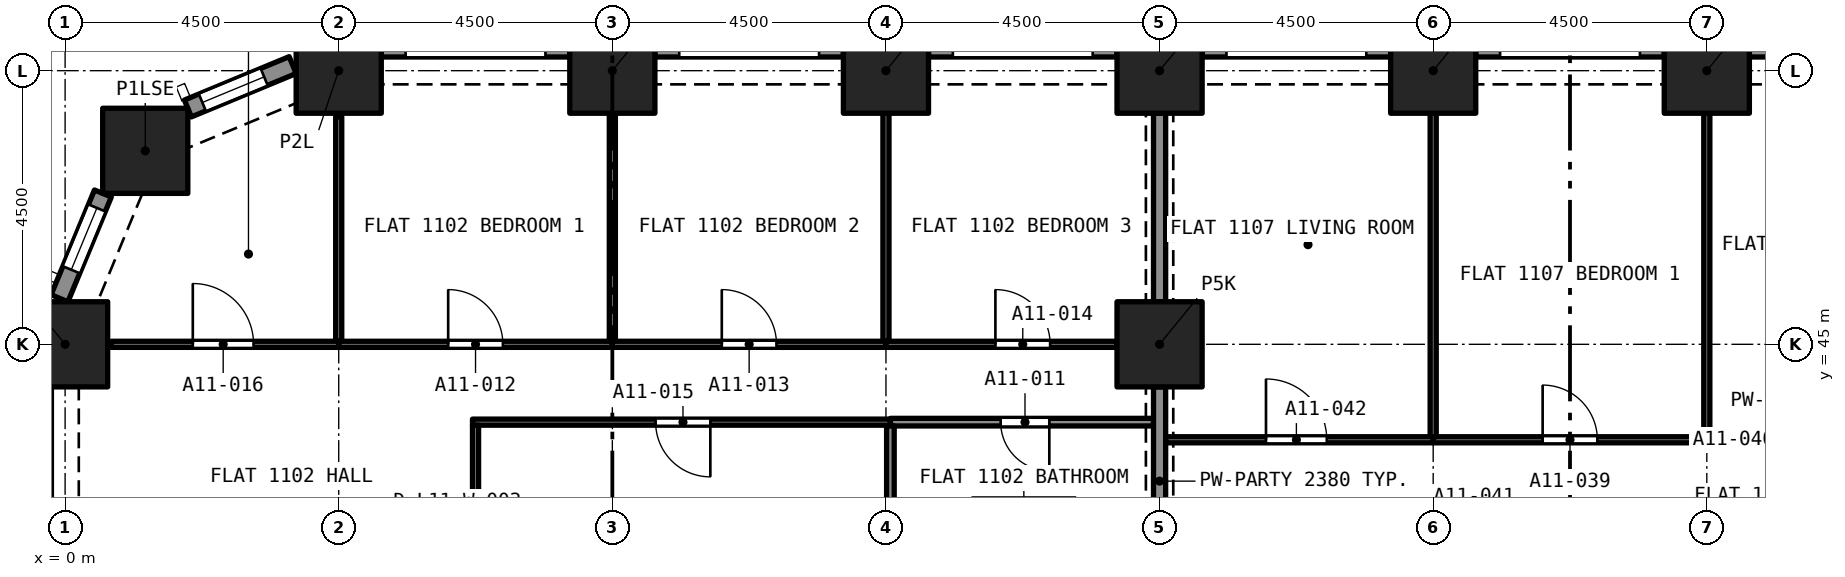
"""IFC4 building model, lengths in metres.
Left out: names, types, materials, properties, quantities, classifications, styles, units other than length and angle.
Written with IfcOpenShell. Run it as: python <this file> out.ifc"""

import sys

from ifc_helpers import new_model, si_unit, direction, frame, frame_2d, origin, origin_2d, place, context, subcontext, project, spatial, rectangle, extrude, element, fill, save


model = new_model("IFC4")
c1 = context("Model", 3, precision=1e-05, world=origin(), true_north=direction((0.0, 1.0)))
c2 = subcontext(c1, "Body", "Model", "MODEL_VIEW")
j1 = project(units=[si_unit("LENGTHUNIT", "METRE"), si_unit("PLANEANGLEUNIT", "RADIAN")], contexts=[c1])
p1 = place(None, origin())
s1 = spatial("IfcSite", under=j1, at=p1, CompositionType="ELEMENT")
p2 = place(p1, origin())
s2 = spatial("IfcBuilding", under=s1, at=p2, CompositionType="ELEMENT")
p3 = place(p2, frame((0.0, 0.0, 46.4)))
s3 = spatial("IfcBuildingStorey", under=s2, at=p3, CompositionType="ELEMENT", Elevation=46.4)
for number, where, z_axis, x_axis in (
    (1, (0.0, 45.0, 0.0), (0.0, 0.0, 1.0), (1.0, 0.0, 0.0)),
    (2, (18.0, 45.0, 0.0), (0.0, 0.0, 1.0), (1.0, 0.0, 0.0)),
    (3, (1.318, 48.182, 0.0), (0.0, 0.0, 1.0), (1.0, 0.0, 0.0)),
    (4, (4.5, 49.5, 0.0), (0.0, 0.0, 1.0), (1.0, 0.0, 0.0)),
    (5, (9.0, 49.5, 0.0), (0.0, 0.0, 1.0), (1.0, 0.0, 0.0)),
    (6, (13.5, 49.5, 0.0), (0.0, 0.0, 1.0), (1.0, 0.0, 0.0)),
    (7, (18.0, 49.5, 0.0), (0.0, 0.0, 1.0), (1.0, 0.0, 0.0)),
    (8, (22.5, 49.5, 0.0), (0.0, 0.0, 1.0), (1.0, 0.0, 0.0)),
    (9, (27.0, 49.5, 0.0), (0.0, 0.0, 1.0), (1.0, 0.0, 0.0)),
):
    element("IfcColumn", number, at=place(p3, frame(where, z_axis=z_axis, x_axis=x_axis)), inside=s3, PredefinedType="COLUMN", context=c2, shape_type="SweptSolid", body=[
        extrude(rectangle(XDim=1.4, YDim=1.4, at=origin_2d()), origin(), (0.0, 0.0, 1.0), 3.2),
    ])
p4 = place(p3, frame((27.7, 49.875, 0.0), z_axis=(0.0, 0.0, 1.0), x_axis=(1.0, 0.0, 0.0)))
e10 = element("IfcWall", 10, at=p4, inside=s3, PredefinedType="SOLIDWALL", context=c2, shape_type="SweptSolid", body=[
    extrude(rectangle(XDim=3.1, YDim=0.3, at=frame_2d((1.55, 0.0))), origin(), (0.0, 0.0, 1.0), 3.2),
])
p5 = place(p4, frame((0.4, 0.0, 0.45)))
e11 = element("IfcOpeningElement", 11, at=p5, cuts=e10, PredefinedType="OPENING", context=c2, shape_type="SweptSolid", body=[
    extrude(rectangle(XDim=2.3, YDim=1.95, at=frame_2d((1.15, 0.975))), frame((0.0, 0.16, 0.0), z_axis=(0.0, -1.0, 0.0), x_axis=(1.0, 0.0, 0.0)), (0.0, 0.0, 1.0), 0.32),
])
p6 = place(p3, frame((23.2, 49.875, 0.0), z_axis=(0.0, 0.0, 1.0), x_axis=(1.0, 0.0, 0.0)))
e12 = element("IfcWall", 12, at=p6, inside=s3, PredefinedType="SOLIDWALL", context=c2, shape_type="SweptSolid", body=[
    extrude(rectangle(XDim=3.1, YDim=0.3, at=frame_2d((1.55, 0.0))), origin(), (0.0, 0.0, 1.0), 3.2),
])
p7 = place(p6, frame((0.4, 0.0, 0.45)))
e13 = element("IfcOpeningElement", 13, at=p7, cuts=e12, PredefinedType="OPENING", context=c2, shape_type="SweptSolid", body=[
    extrude(rectangle(XDim=2.3, YDim=1.95, at=frame_2d((1.15, 0.975))), frame((0.0, 0.16, 0.0), z_axis=(0.0, -1.0, 0.0), x_axis=(1.0, 0.0, 0.0)), (0.0, 0.0, 1.0), 0.32),
])
p8 = place(p3, frame((18.7, 49.875, 0.0), z_axis=(0.0, 0.0, 1.0), x_axis=(1.0, 0.0, 0.0)))
e14 = element("IfcWall", 14, at=p8, inside=s3, PredefinedType="SOLIDWALL", context=c2, shape_type="SweptSolid", body=[
    extrude(rectangle(XDim=3.1, YDim=0.3, at=frame_2d((1.55, 0.0))), origin(), (0.0, 0.0, 1.0), 3.2),
])
p9 = place(p8, frame((0.4, 0.0, 0.45)))
e15 = element("IfcOpeningElement", 15, at=p9, cuts=e14, PredefinedType="OPENING", context=c2, shape_type="SweptSolid", body=[
    extrude(rectangle(XDim=2.3, YDim=1.95, at=frame_2d((1.15, 0.975))), frame((0.0, 0.16, 0.0), z_axis=(0.0, -1.0, 0.0), x_axis=(1.0, 0.0, 0.0)), (0.0, 0.0, 1.0), 0.32),
])
p10 = place(p3, frame((14.2, 49.875, 0.0), z_axis=(0.0, 0.0, 1.0), x_axis=(1.0, 0.0, 0.0)))
e16 = element("IfcWall", 16, at=p10, inside=s3, PredefinedType="SOLIDWALL", context=c2, shape_type="SweptSolid", body=[
    extrude(rectangle(XDim=3.1, YDim=0.3, at=frame_2d((1.55, 0.0))), origin(), (0.0, 0.0, 1.0), 3.2),
])
p11 = place(p10, frame((0.4, 0.0, 0.45)))
e17 = element("IfcOpeningElement", 17, at=p11, cuts=e16, PredefinedType="OPENING", context=c2, shape_type="SweptSolid", body=[
    extrude(rectangle(XDim=2.3, YDim=1.95, at=frame_2d((1.15, 0.975))), frame((0.0, 0.16, 0.0), z_axis=(0.0, -1.0, 0.0), x_axis=(1.0, 0.0, 0.0)), (0.0, 0.0, 1.0), 0.32),
])
p12 = place(p3, frame((9.7, 49.875, 0.0), z_axis=(0.0, 0.0, 1.0), x_axis=(1.0, 0.0, 0.0)))
e18 = element("IfcWall", 18, at=p12, inside=s3, PredefinedType="SOLIDWALL", context=c2, shape_type="SweptSolid", body=[
    extrude(rectangle(XDim=3.1, YDim=0.3, at=frame_2d((1.55, 0.0))), origin(), (0.0, 0.0, 1.0), 3.2),
])
p13 = place(p12, frame((0.4, 0.0, 0.45)))
e19 = element("IfcOpeningElement", 19, at=p13, cuts=e18, PredefinedType="OPENING", context=c2, shape_type="SweptSolid", body=[
    extrude(rectangle(XDim=2.3, YDim=1.95, at=frame_2d((1.15, 0.975))), frame((0.0, 0.16, 0.0), z_axis=(0.0, -1.0, 0.0), x_axis=(1.0, 0.0, 0.0)), (0.0, 0.0, 1.0), 0.32),
])
p14 = place(p3, frame((5.2, 49.875, 0.0), z_axis=(0.0, 0.0, 1.0), x_axis=(1.0, 0.0, 0.0)))
e20 = element("IfcWall", 20, at=p14, inside=s3, PredefinedType="SOLIDWALL", context=c2, shape_type="SweptSolid", body=[
    extrude(rectangle(XDim=3.1, YDim=0.3, at=frame_2d((1.55, 0.0))), origin(), (0.0, 0.0, 1.0), 3.2),
])
p15 = place(p14, frame((0.4, 0.0, 0.45)))
e21 = element("IfcOpeningElement", 21, at=p15, cuts=e20, PredefinedType="OPENING", context=c2, shape_type="SweptSolid", body=[
    extrude(rectangle(XDim=2.3, YDim=1.95, at=frame_2d((1.15, 0.975))), frame((0.0, 0.16, 0.0), z_axis=(0.0, -1.0, 0.0), x_axis=(1.0, 0.0, 0.0)), (0.0, 0.0, 1.0), 0.32),
])
p16 = place(p3, frame((2.02, 48.878, 0.0), z_axis=(0.0, 0.0, 1.0), x_axis=(0.923903565336, 0.38262540684, 0.0)))
e22 = element("IfcWall", 22, at=p16, inside=s3, PredefinedType="SOLIDWALL", context=c2, shape_type="SweptSolid", body=[
    extrude(rectangle(XDim=1.865, YDim=0.3, at=frame_2d((0.933, 0.0))), origin(), (0.0, 0.0, 1.0), 3.2),
])
p17 = place(p16, frame((0.258, 0.0, 0.45)))
e23 = element("IfcOpeningElement", 23, at=p17, cuts=e22, PredefinedType="OPENING", context=c2, shape_type="SweptSolid", body=[
    extrude(rectangle(XDim=1.1, YDim=1.95, at=frame_2d((0.55, 0.975))), frame((0.0, 0.16, 0.0), z_axis=(0.0, -1.0, 0.0), x_axis=(1.0, 0.0, 0.0)), (0.0, 0.0, 1.0), 0.32),
])
p18 = place(p3, frame((-0.092, 45.757, 0.0), z_axis=(0.0, 0.0, 1.0), x_axis=(0.382737135771, 0.923857286003, 0.0)))
e24 = element("IfcWall", 24, at=p18, inside=s3, PredefinedType="SOLIDWALL", context=c2, shape_type="SweptSolid", body=[
    extrude(rectangle(XDim=1.865, YDim=0.3, at=frame_2d((0.933, 0.0))), origin(), (0.0, 0.0, 1.0), 3.2),
])
p19 = place(p18, frame((0.508, 0.0, 0.45)))
e25 = element("IfcOpeningElement", 25, at=p19, cuts=e24, PredefinedType="OPENING", context=c2, shape_type="SweptSolid", body=[
    extrude(rectangle(XDim=1.1, YDim=1.95, at=frame_2d((0.55, 0.975))), frame((0.0, 0.16, 0.0), z_axis=(0.0, -1.0, 0.0), x_axis=(1.0, 0.0, 0.0)), (0.0, 0.0, 1.0), 0.32),
])
p20 = place(p3, frame((17.9, 43.72, 0.0), z_axis=(0.0, 0.0, 1.0), x_axis=(-1.0, 0.0, 0.0)))
e26 = element("IfcWall", 26, at=p20, inside=s3, PredefinedType="PARTITIONING", context=c2, shape_type="SweptSolid", body=[
    extrude(rectangle(XDim=4.327, YDim=0.125, at=frame_2d((2.163, 0.0))), origin(), (0.0, 0.0, 1.0), 2.9),
])
p21 = place(p20, frame((1.713, 0.0, 0.0)))
e27 = element("IfcOpeningElement", 27, at=p21, cuts=e26, PredefinedType="OPENING", context=c2, shape_type="SweptSolid", body=[
    extrude(rectangle(XDim=0.8, YDim=2.1, at=frame_2d((0.4, 1.05))), frame((0.0, 0.073, 0.0), z_axis=(0.0, -1.0, 0.0), x_axis=(1.0, 0.0, 0.0)), (0.0, 0.0, 1.0), 0.145),
])
p22 = place(p3, frame((13.573, 40.575, 0.0), z_axis=(0.0, 0.0, 1.0), x_axis=(0.0, 1.0, 0.0)))
e28 = element("IfcWall", 28, at=p22, inside=s3, PredefinedType="PARTITIONING", context=c2, shape_type="SweptSolid", body=[
    extrude(rectangle(XDim=3.083, YDim=0.125, at=frame_2d((1.541, 0.0))), origin(), (0.0, 0.0, 1.0), 2.9),
])
p23 = place(p3, frame((18.0, 41.2, 0.0), z_axis=(0.0, 0.0, 1.0), x_axis=(0.0, 1.0, 0.0)))
e29 = element("IfcWall", 29, at=p23, inside=s3, PredefinedType="PARTITIONING", context=c2, shape_type="SweptSolid", body=[
    extrude(rectangle(XDim=3.1, YDim=0.2, at=frame_2d((1.55, 0.0))), origin(), (0.0, 0.0, 1.0), 2.38),
])
p24 = place(p3, frame((9.0, 45.05, 0.0), z_axis=(0.0, 0.0, 1.0), x_axis=(0.0, 1.0, 0.0)))
e30 = element("IfcWall", 30, at=p24, inside=s3, PredefinedType="PARTITIONING", context=c2, shape_type="SweptSolid", body=[
    extrude(rectangle(XDim=3.75, YDim=0.1, at=frame_2d((1.875, 0.0))), origin(), (0.0, 0.0, 1.0), 2.9),
])
p25 = place(p3, frame((4.5, 45.0, 0.0), z_axis=(0.0, 0.0, 1.0), x_axis=(1.0, 0.0, 0.0)))
e31 = element("IfcWall", 31, at=p25, inside=s3, PredefinedType="PARTITIONING", context=c2, shape_type="SweptSolid", body=[
    extrude(rectangle(XDim=4.5, YDim=0.1, at=frame_2d((2.25, 0.0))), origin(), (0.0, 0.0, 1.0), 2.9),
])
p26 = place(p25, frame((1.8, 0.0, 0.0)))
e32 = element("IfcOpeningElement", 32, at=p26, cuts=e31, PredefinedType="OPENING", context=c2, shape_type="SweptSolid", body=[
    extrude(rectangle(XDim=0.9, YDim=2.1, at=frame_2d((0.45, 1.05))), frame((0.0, 0.06, 0.0), z_axis=(0.0, -1.0, 0.0), x_axis=(1.0, 0.0, 0.0)), (0.0, 0.0, 1.0), 0.12),
])
p27 = place(p3, frame((4.5, 45.05, 0.0), z_axis=(0.0, 0.0, 1.0), x_axis=(0.0, 1.0, 0.0)))
e33 = element("IfcWall", 33, at=p27, inside=s3, PredefinedType="PARTITIONING", context=c2, shape_type="SweptSolid", body=[
    extrude(rectangle(XDim=3.692, YDim=0.1, at=frame_2d((1.846, 0.0))), origin(), (0.0, 0.0, 1.0), 2.9),
])
p28 = place(p3, frame((13.5, 45.05, 0.0), z_axis=(0.0, 0.0, 1.0), x_axis=(0.0, 1.0, 0.0)))
e34 = element("IfcWall", 34, at=p28, inside=s3, PredefinedType="PARTITIONING", context=c2, shape_type="SweptSolid", body=[
    extrude(rectangle(XDim=3.75, YDim=0.1, at=frame_2d((1.875, 0.0))), origin(), (0.0, 0.0, 1.0), 2.9),
])
p29 = place(p3, frame((9.0, 45.0, 0.0), z_axis=(0.0, 0.0, 1.0), x_axis=(1.0, 0.0, 0.0)))
e35 = element("IfcWall", 35, at=p29, inside=s3, PredefinedType="PARTITIONING", context=c2, shape_type="SweptSolid", body=[
    extrude(rectangle(XDim=4.5, YDim=0.1, at=frame_2d((2.25, 0.0))), origin(), (0.0, 0.0, 1.0), 2.9),
])
p30 = place(p29, frame((1.8, 0.0, 0.0)))
e36 = element("IfcOpeningElement", 36, at=p30, cuts=e35, PredefinedType="OPENING", context=c2, shape_type="SweptSolid", body=[
    extrude(rectangle(XDim=0.9, YDim=2.1, at=frame_2d((0.45, 1.05))), frame((0.0, 0.06, 0.0), z_axis=(0.0, -1.0, 0.0), x_axis=(1.0, 0.0, 0.0)), (0.0, 0.0, 1.0), 0.12),
])
p31 = place(p3, frame((13.5, 45.0, 0.0), z_axis=(0.0, 0.0, 1.0), x_axis=(1.0, 0.0, 0.0)))
e37 = element("IfcWall", 37, at=p31, inside=s3, PredefinedType="PARTITIONING", context=c2, shape_type="SweptSolid", body=[
    extrude(rectangle(XDim=3.8, YDim=0.1, at=frame_2d((1.9, 0.0))), origin(), (0.0, 0.0, 1.0), 2.9),
])
p32 = place(p31, frame((1.8, 0.0, 0.0)))
e38 = element("IfcOpeningElement", 38, at=p32, cuts=e37, PredefinedType="OPENING", context=c2, shape_type="SweptSolid", body=[
    extrude(rectangle(XDim=0.9, YDim=2.1, at=frame_2d((0.45, 1.05))), frame((0.0, 0.06, 0.0), z_axis=(0.0, -1.0, 0.0), x_axis=(1.0, 0.0, 0.0)), (0.0, 0.0, 1.0), 0.12),
])
p33 = place(p3, frame((18.0, 45.7, 0.0), z_axis=(0.0, 0.0, 1.0), x_axis=(0.0, 1.0, 0.0)))
e39 = element("IfcWall", 39, at=p33, inside=s3, PredefinedType="PARTITIONING", context=c2, shape_type="SweptSolid", body=[
    extrude(rectangle(XDim=3.1, YDim=0.2, at=frame_2d((1.55, 0.0))), origin(), (0.0, 0.0, 1.0), 2.38),
])
p34 = place(p3, frame((13.573, 43.72, 0.0), z_axis=(0.0, 0.0, 1.0), x_axis=(-1.0, 0.0, 0.0)))
e40 = element("IfcWall", 40, at=p34, inside=s3, PredefinedType="PARTITIONING", context=c2, shape_type="SweptSolid", body=[
    extrude(rectangle(XDim=6.873, YDim=0.1, at=frame_2d((3.437, 0.0))), origin(), (0.0, 0.0, 1.0), 2.9),
])
p35 = place(p34, frame((2.962, 0.0, 0.0)))
e41 = element("IfcOpeningElement", 41, at=p35, cuts=e40, PredefinedType="OPENING", context=c2, shape_type="SweptSolid", body=[
    extrude(rectangle(XDim=0.9, YDim=2.1, at=frame_2d((0.45, 1.05))), frame((0.0, 0.06, 0.0), z_axis=(0.0, -1.0, 0.0), x_axis=(1.0, 0.0, 0.0)), (0.0, 0.0, 1.0), 0.12),
])
p36 = place(p3, frame((6.75, 40.5, 0.0), z_axis=(0.0, 0.0, 1.0), x_axis=(0.0, 1.0, 0.0)))
e42 = element("IfcWall", 42, at=p36, inside=s3, PredefinedType="PARTITIONING", context=c2, shape_type="SweptSolid", body=[
    extrude(rectangle(XDim=3.17, YDim=0.1, at=frame_2d((1.585, 0.0))), origin(), (0.0, 0.0, 1.0), 2.9),
])
p37 = place(p3, frame((0.758, 45.0, 0.0), z_axis=(0.0, 0.0, 1.0), x_axis=(1.0, 0.0, 0.0)))
e43 = element("IfcWall", 43, at=p37, inside=s3, PredefinedType="PARTITIONING", context=c2, shape_type="SweptSolid", body=[
    extrude(rectangle(XDim=3.742, YDim=0.1, at=frame_2d((1.871, 0.0))), origin(), (0.0, 0.0, 1.0), 2.9),
])
p38 = place(p37, frame((1.342, 0.0, 0.0)))
e44 = element("IfcOpeningElement", 44, at=p38, cuts=e43, PredefinedType="OPENING", context=c2, shape_type="SweptSolid", body=[
    extrude(rectangle(XDim=1.0, YDim=2.1, at=frame_2d((0.5, 1.05))), frame((0.0, 0.06, 0.0), z_axis=(0.0, -1.0, 0.0), x_axis=(1.0, 0.0, 0.0)), (0.0, 0.0, 1.0), 0.12),
])
p39 = place(p3, frame((27.0, 43.48, 0.0), z_axis=(0.0, 0.0, 1.0), x_axis=(0.0, 1.0, 0.0)))
e45 = element("IfcWall", 45, at=p39, inside=s3, PredefinedType="PARTITIONING", context=c2, shape_type="SweptSolid", body=[
    extrude(rectangle(XDim=5.32, YDim=0.1, at=frame_2d((2.66, 0.0))), origin(), (0.0, 0.0, 1.0), 2.75),
])
p40 = place(p3, frame((22.5, 43.43, 0.0), z_axis=(0.0, 0.0, 1.0), x_axis=(1.0, 0.0, 0.0)))
e46 = element("IfcWall", 46, at=p40, inside=s3, PredefinedType="PARTITIONING", context=c2, shape_type="SweptSolid", body=[
    extrude(rectangle(XDim=4.5, YDim=0.1, at=frame_2d((2.25, 0.0))), origin(), (0.0, 0.0, 1.0), 2.75),
])
p41 = place(p40, frame((1.8, 0.0, 0.0)))
e47 = element("IfcOpeningElement", 47, at=p41, cuts=e46, PredefinedType="OPENING", context=c2, shape_type="SweptSolid", body=[
    extrude(rectangle(XDim=0.9, YDim=2.1, at=frame_2d((0.45, 1.05))), frame((0.0, 0.06, 0.0), z_axis=(0.0, -1.0, 0.0), x_axis=(1.0, 0.0, 0.0)), (0.0, 0.0, 1.0), 0.12),
])
p42 = place(p3, frame((22.5, 43.48, 0.0), z_axis=(0.0, 0.0, 1.0), x_axis=(0.0, 1.0, 0.0)))
e48 = element("IfcWall", 48, at=p42, inside=s3, PredefinedType="PARTITIONING", context=c2, shape_type="SweptSolid", body=[
    extrude(rectangle(XDim=5.32, YDim=0.1, at=frame_2d((2.66, 0.0))), origin(), (0.0, 0.0, 1.0), 2.75),
])
p43 = place(p3, frame((27.0, 43.43, 0.0), z_axis=(0.0, 0.0, 1.0), x_axis=(1.0, 0.0, 0.0)))
e49 = element("IfcWall", 49, at=p43, inside=s3, PredefinedType="PARTITIONING", context=c2, shape_type="SweptSolid", body=[
    extrude(rectangle(XDim=4.4, YDim=0.1, at=frame_2d((2.2, 0.0))), origin(), (0.0, 0.0, 1.0), 2.75),
])
p44 = place(p43, frame((1.8, 0.0, 0.0)))
e50 = element("IfcOpeningElement", 50, at=p44, cuts=e49, PredefinedType="OPENING", context=c2, shape_type="SweptSolid", body=[
    extrude(rectangle(XDim=0.9, YDim=2.1, at=frame_2d((0.45, 1.05))), frame((0.0, 0.06, 0.0), z_axis=(0.0, -1.0, 0.0), x_axis=(1.0, 0.0, 0.0)), (0.0, 0.0, 1.0), 0.12),
])
p45 = place(p3, frame((18.1, 43.43, 0.0), z_axis=(0.0, 0.0, 1.0), x_axis=(1.0, 0.0, 0.0)))
e51 = element("IfcWall", 51, at=p45, inside=s3, PredefinedType="PARTITIONING", context=c2, shape_type="SweptSolid", body=[
    extrude(rectangle(XDim=4.4, YDim=0.1, at=frame_2d((2.2, 0.0))), origin(), (0.0, 0.0, 1.0), 2.75),
])
p46 = place(p45, frame((1.65, 0.0, 0.0)))
e52 = element("IfcOpeningElement", 52, at=p46, cuts=e51, PredefinedType="OPENING", context=c2, shape_type="SweptSolid", body=[
    extrude(rectangle(XDim=1.0, YDim=2.1, at=frame_2d((0.5, 1.05))), frame((0.0, 0.06, 0.0), z_axis=(0.0, -1.0, 0.0), x_axis=(1.0, 0.0, 0.0)), (0.0, 0.0, 1.0), 0.12),
])
p47 = place(p17, origin())
e53 = element("IfcWindow", 53, at=p47, inside=s3, PartitioningType="SINGLE_PANEL", PredefinedType="WINDOW", context=c2, shape_type="SweptSolid", body=[
    extrude(rectangle(XDim=1.1, YDim=1.95, at=frame_2d((0.55, 0.975))), frame((0.0, 0.03, 0.0), z_axis=(0.0, -1.0, 0.0), x_axis=(1.0, 0.0, 0.0)), (0.0, 0.0, 1.0), 0.06),
])
fill(e23, e53)
p48 = place(p19, origin())
e54 = element("IfcWindow", 54, at=p48, inside=s3, PartitioningType="SINGLE_PANEL", PredefinedType="WINDOW", context=c2, shape_type="SweptSolid", body=[
    extrude(rectangle(XDim=1.1, YDim=1.95, at=frame_2d((0.55, 0.975))), frame((0.0, 0.03, 0.0), z_axis=(0.0, -1.0, 0.0), x_axis=(1.0, 0.0, 0.0)), (0.0, 0.0, 1.0), 0.06),
])
fill(e25, e54)
p49 = place(p21, origin())
e55 = element("IfcDoor", 55, at=p49, inside=s3, OperationType="SINGLE_SWING_LEFT", PredefinedType="DOOR", context=c2, shape_type="SweptSolid", body=[
    extrude(rectangle(XDim=0.8, YDim=2.1, at=frame_2d((0.4, 1.05))), frame((0.0, 0.025, 0.0), z_axis=(0.0, -1.0, 0.0), x_axis=(1.0, 0.0, 0.0)), (0.0, 0.0, 1.0), 0.05),
])
fill(e27, e55)
p50 = place(p26, origin())
e56 = element("IfcDoor", 56, at=p50, inside=s3, OperationType="SINGLE_SWING_RIGHT", PredefinedType="DOOR", context=c2, shape_type="SweptSolid", body=[
    extrude(rectangle(XDim=0.9, YDim=2.1, at=frame_2d((0.45, 1.05))), frame((0.0, 0.025, 0.0), z_axis=(0.0, -1.0, 0.0), x_axis=(1.0, 0.0, 0.0)), (0.0, 0.0, 1.0), 0.05),
])
fill(e32, e56)
p51 = place(p30, origin())
e57 = element("IfcDoor", 57, at=p51, inside=s3, OperationType="SINGLE_SWING_LEFT", PredefinedType="DOOR", context=c2, shape_type="SweptSolid", body=[
    extrude(rectangle(XDim=0.9, YDim=2.1, at=frame_2d((0.45, 1.05))), frame((0.0, 0.025, 0.0), z_axis=(0.0, -1.0, 0.0), x_axis=(1.0, 0.0, 0.0)), (0.0, 0.0, 1.0), 0.05),
])
fill(e36, e57)
p52 = place(p32, origin())
e58 = element("IfcDoor", 58, at=p52, inside=s3, OperationType="SINGLE_SWING_RIGHT", PredefinedType="DOOR", context=c2, shape_type="SweptSolid", body=[
    extrude(rectangle(XDim=0.9, YDim=2.1, at=frame_2d((0.45, 1.05))), frame((0.0, 0.025, 0.0), z_axis=(0.0, -1.0, 0.0), x_axis=(1.0, 0.0, 0.0)), (0.0, 0.0, 1.0), 0.05),
])
fill(e38, e58)
p53 = place(p35, origin())
e59 = element("IfcDoor", 59, at=p53, inside=s3, OperationType="SINGLE_SWING_LEFT", PredefinedType="DOOR", context=c2, shape_type="SweptSolid", body=[
    extrude(rectangle(XDim=0.9, YDim=2.1, at=frame_2d((0.45, 1.05))), frame((0.0, 0.025, 0.0), z_axis=(0.0, -1.0, 0.0), x_axis=(1.0, 0.0, 0.0)), (0.0, 0.0, 1.0), 0.05),
])
fill(e41, e59)
p54 = place(p38, origin())
e60 = element("IfcDoor", 60, at=p54, inside=s3, OperationType="SINGLE_SWING_LEFT", PredefinedType="DOOR", context=c2, shape_type="SweptSolid", body=[
    extrude(rectangle(XDim=1.0, YDim=2.1, at=frame_2d((0.5, 1.05))), frame((0.0, 0.025, 0.0), z_axis=(0.0, -1.0, 0.0), x_axis=(1.0, 0.0, 0.0)), (0.0, 0.0, 1.0), 0.05),
])
fill(e44, e60)
p55 = place(p41, origin())
e61 = element("IfcDoor", 61, at=p55, inside=s3, OperationType="SINGLE_SWING_LEFT", PredefinedType="DOOR", context=c2, shape_type="SweptSolid", body=[
    extrude(rectangle(XDim=0.9, YDim=2.1, at=frame_2d((0.45, 1.05))), frame((0.0, 0.025, 0.0), z_axis=(0.0, -1.0, 0.0), x_axis=(1.0, 0.0, 0.0)), (0.0, 0.0, 1.0), 0.05),
])
fill(e47, e61)
p56 = place(p46, origin())
e62 = element("IfcDoor", 62, at=p56, inside=s3, OperationType="SINGLE_SWING_LEFT", PredefinedType="DOOR", context=c2, shape_type="SweptSolid", body=[
    extrude(rectangle(XDim=1.0, YDim=2.1, at=frame_2d((0.5, 1.05))), frame((0.0, 0.025, 0.0), z_axis=(0.0, -1.0, 0.0), x_axis=(1.0, 0.0, 0.0)), (0.0, 0.0, 1.0), 0.05),
])
fill(e52, e62)
save(model, sys.argv[1])
